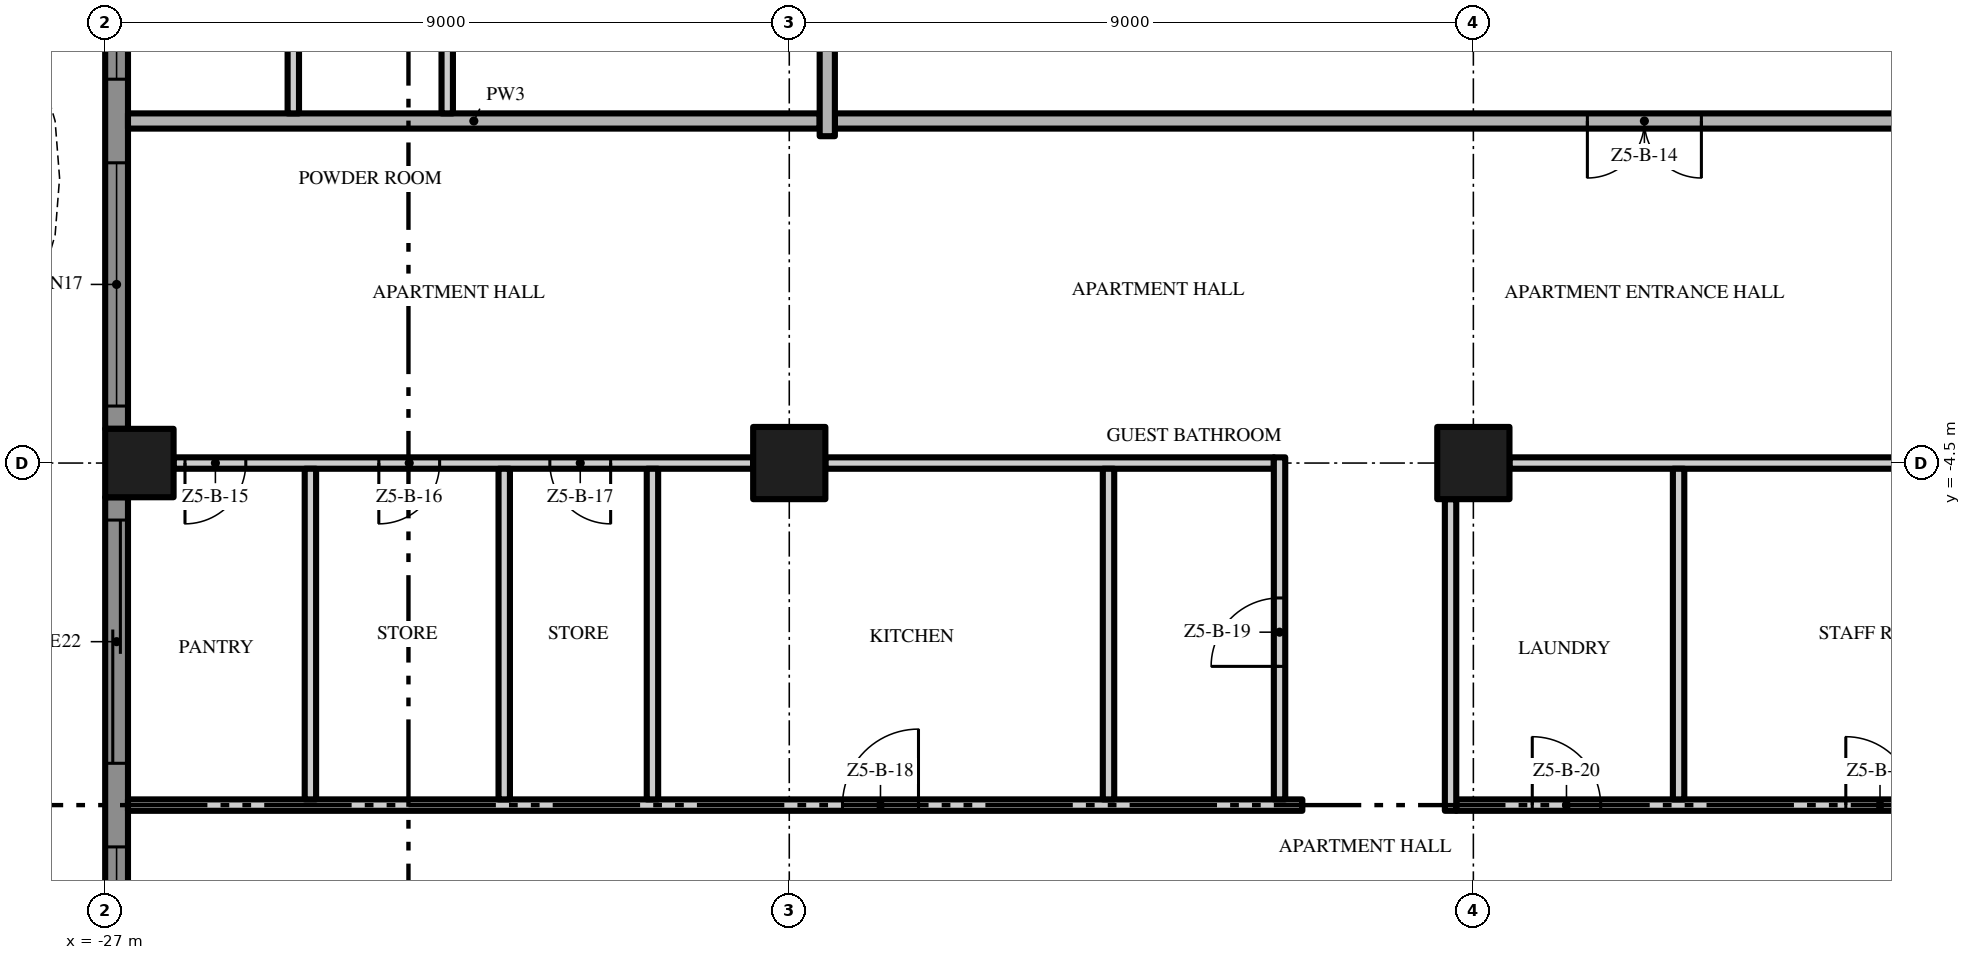
"""IFC4 building model, lengths in metres.
Left out: names, types, materials, properties, quantities, classifications, styles, units other than length and angle.
Written with IfcOpenShell. Run it as: python <this file> out.ifc"""

import sys

from ifc_helpers import new_model, si_unit, direction, frame, frame_2d, origin, origin_2d, place, context, subcontext, project, spatial, polyline, rectangle, outline, extrude, element, fill, save


model = new_model("IFC4")
c1 = context("Model", 3, precision=1e-05, world=origin(), true_north=direction((0.0, 1.0)))
c2 = subcontext(c1, "Body", "Model", "MODEL_VIEW")
j1 = project(units=[si_unit("LENGTHUNIT", "METRE"), si_unit("PLANEANGLEUNIT", "RADIAN")], contexts=[c1])
p1 = place(None, origin())
s1 = spatial("IfcSite", under=j1, at=p1, CompositionType="ELEMENT")
p2 = place(p1, origin())
s2 = spatial("IfcBuilding", under=s1, at=p2, CompositionType="ELEMENT")
p3 = place(p2, frame((0.0, 0.0, 257.8)))
s3 = spatial("IfcBuildingStorey", under=s2, at=p3, CompositionType="ELEMENT", Elevation=257.8)
p4 = place(p3, frame((-18.0, -4.5, 0.0), z_axis=(0.0, 0.0, 1.0), x_axis=(1.0, 0.0, 0.0)))
e1 = element("IfcColumn", 1, at=p4, inside=s3, PredefinedType="COLUMN", context=c2, shape_type="SweptSolid", body=[
    extrude(rectangle(XDim=0.95, YDim=0.95, at=origin_2d()), origin(), (0.0, 0.0, 1.0), 3.5),
])
p5 = place(p3, frame((-26.55, -4.5, 0.0), z_axis=(0.0, 0.0, 1.0), x_axis=(1.0, 0.0, 0.0)))
e2 = element("IfcColumn", 2, at=p5, inside=s3, PredefinedType="COLUMN", context=c2, shape_type="SweptSolid", body=[
    extrude(rectangle(XDim=0.9, YDim=0.9, at=origin_2d()), origin(), (0.0, 0.0, 1.0), 3.5),
])
p6 = place(p3, frame((-9.0, -4.5, 0.0), z_axis=(0.0, 0.0, 1.0), x_axis=(1.0, 0.0, 0.0)))
e3 = element("IfcColumn", 3, at=p6, inside=s3, PredefinedType="COLUMN", context=c2, shape_type="SweptSolid", body=[
    extrude(rectangle(XDim=0.95, YDim=0.95, at=origin_2d()), origin(), (0.0, 0.0, 1.0), 3.5),
])
p7 = place(p3, frame((-26.85, -4.05, 0.0), z_axis=(0.0, 0.0, 1.0), x_axis=(0.0, 1.0, 0.0)))
e4 = element("IfcWall", 4, at=p7, inside=s3, PredefinedType="SOLIDWALL", context=c2, shape_type="SweptSolid", body=[
    extrude(rectangle(XDim=8.1, YDim=0.3, at=frame_2d((4.05, 0.0))), origin(), (0.0, 0.0, 1.0), 3.5),
])
p8 = place(p7, frame((4.6, 0.0, 0.45)))
e5 = element("IfcOpeningElement", 5, at=p8, cuts=e4, PredefinedType="OPENING", context=c2, shape_type="SweptSolid", body=[
    extrude(rectangle(XDim=3.2, YDim=2.65, at=frame_2d((1.6, 1.325))), frame((0.0, 0.16, 0.0), z_axis=(0.0, -1.0, 0.0), x_axis=(1.0, 0.0, 0.0)), (0.0, 0.0, 1.0), 0.32),
])
p9 = place(p7, frame((0.3, 0.0, 0.45)))
e6 = element("IfcOpeningElement", 6, at=p9, cuts=e4, PredefinedType="OPENING", context=c2, shape_type="SweptSolid", body=[
    extrude(rectangle(XDim=3.2, YDim=2.65, at=frame_2d((1.6, 1.325))), frame((0.0, 0.16, 0.0), z_axis=(0.0, -1.0, 0.0), x_axis=(1.0, 0.0, 0.0)), (0.0, 0.0, 1.0), 0.32),
])
p10 = place(p3, frame((-26.85, -13.05, 0.0), z_axis=(0.0, 0.0, 1.0), x_axis=(0.0, 1.0, 0.0)))
e7 = element("IfcWall", 7, at=p10, inside=s3, PredefinedType="SOLIDWALL", context=c2, shape_type="SweptSolid", body=[
    extrude(rectangle(XDim=8.1, YDim=0.3, at=frame_2d((4.05, 0.0))), origin(), (0.0, 0.0, 1.0), 3.5),
])
p11 = place(p10, frame((4.6, 0.0, 0.0)))
e8 = element("IfcOpeningElement", 8, at=p11, cuts=e7, PredefinedType="OPENING", context=c2, shape_type="SweptSolid", body=[
    extrude(rectangle(XDim=3.2, YDim=2.4, at=frame_2d((1.6, 1.2))), frame((0.0, 0.16, 0.0), z_axis=(0.0, -1.0, 0.0), x_axis=(1.0, 0.0, 0.0)), (0.0, 0.0, 1.0), 0.32),
])
p12 = place(p10, frame((0.3, 0.0, 0.45)))
e9 = element("IfcOpeningElement", 9, at=p12, cuts=e7, PredefinedType="OPENING", context=c2, shape_type="SweptSolid", body=[
    extrude(rectangle(XDim=3.2, YDim=2.65, at=frame_2d((1.6, 1.325))), frame((0.0, 0.16, 0.0), z_axis=(0.0, -1.0, 0.0), x_axis=(1.0, 0.0, 0.0)), (0.0, 0.0, 1.0), 0.32),
])
p13 = place(p3, origin())
e10 = element("IfcWall", 10, at=p13, inside=s3, PredefinedType="USERDEFINED", context=c2, shape_type="SweptSolid", body=[
    extrude(outline(polyline([(-28.8, 18.0), (-28.095, 16.5), (-27.659, 15.0), (-27.6, 14.25), (-27.659, 13.5), (-28.095, 12.0), (-28.8, 10.5), (-29.505, 9.0), (-29.941, 7.5), (-30.0, 6.75), (-29.941, 6.0), (-29.505, 4.5), (-28.8, 3.0), (-28.095, 1.5), (-27.659, 0.0), (-27.6, -0.75), (-27.659, -1.5), (-28.095, -3.0), (-28.8, -4.5), (-29.505, -6.0), (-29.941, -7.5), (-30.0, -8.25), (-29.941, -9.0), (-29.505, -10.5), (-28.8, -12.0), (-28.095, -13.5), (-27.659, -15.0), (-27.6, -15.75), (-27.659, -16.5), (-28.095, -18.0), (-27.855, -18.07), (-27.411, -16.545), (-27.349, -15.75), (-27.411, -14.955), (-27.86, -13.411), (-28.574, -11.894), (-29.271, -10.411), (-29.694, -8.955), (-29.749, -8.25), (-29.694, -7.545), (-29.271, -6.089), (-28.574, -4.606), (-27.86, -3.089), (-27.411, -1.545), (-27.349, -0.75), (-27.411, 0.045), (-27.86, 1.589), (-28.574, 3.106), (-29.271, 4.589), (-29.694, 6.045), (-29.749, 6.75), (-29.694, 7.455), (-29.271, 8.911), (-28.574, 10.394), (-27.86, 11.911), (-27.411, 13.455), (-27.349, 14.25), (-27.411, 15.045), (-27.86, 16.589), (-28.574, 18.106), (-28.8, 18.0)])), origin(), (0.0, 0.0, 1.0), 0.9),
])
p14 = place(p3, frame((-26.7, -9.0, 0.0), z_axis=(0.0, 0.0, 1.0), x_axis=(1.0, 0.0, 0.0)))
e11 = element("IfcWall", 11, at=p14, inside=s3, PredefinedType="PARTITIONING", context=c2, shape_type="SweptSolid", body=[
    extrude(rectangle(XDim=15.45, YDim=0.15, at=frame_2d((7.725, 0.0))), origin(), (0.0, 0.0, 1.0), 3.5),
])
p15 = place(p14, frame((9.4, 0.0, 0.0)))
e12 = element("IfcOpeningElement", 12, at=p15, cuts=e11, PredefinedType="OPENING", context=c2, shape_type="SweptSolid", body=[
    extrude(rectangle(XDim=1.0, YDim=2.4, at=frame_2d((0.5, 1.2))), frame((0.0, 0.085, 0.0), z_axis=(0.0, -1.0, 0.0), x_axis=(1.0, 0.0, 0.0)), (0.0, 0.0, 1.0), 0.17),
])
p16 = place(p3, frame((-9.225, -9.0, 0.0), z_axis=(0.0, 0.0, 1.0), x_axis=(1.0, 0.0, 0.0)))
e13 = element("IfcWall", 13, at=p16, inside=s3, PredefinedType="PARTITIONING", context=c2, shape_type="SweptSolid", body=[
    extrude(rectangle(XDim=13.625, YDim=0.15, at=frame_2d((6.812, 0.0))), origin(), (0.0, 0.0, 1.0), 3.5),
])
p17 = place(p16, frame((1.0, 0.0, 0.0)))
e14 = element("IfcOpeningElement", 14, at=p17, cuts=e13, PredefinedType="OPENING", context=c2, shape_type="SweptSolid", body=[
    extrude(rectangle(XDim=0.9, YDim=2.1, at=frame_2d((0.45, 1.05))), frame((0.0, 0.085, 0.0), z_axis=(0.0, -1.0, 0.0), x_axis=(1.0, 0.0, 0.0)), (0.0, 0.0, 1.0), 0.17),
])
p18 = place(p16, frame((5.125, 0.0, 0.0)))
e15 = element("IfcOpeningElement", 15, at=p18, cuts=e13, PredefinedType="OPENING", context=c2, shape_type="SweptSolid", body=[
    extrude(rectangle(XDim=0.9, YDim=2.1, at=frame_2d((0.45, 1.05))), frame((0.0, 0.085, 0.0), z_axis=(0.0, -1.0, 0.0), x_axis=(1.0, 0.0, 0.0)), (0.0, 0.0, 1.0), 0.17),
])
p19 = place(p3, frame((-18.475, -4.5, 0.0), z_axis=(0.0, 0.0, 1.0), x_axis=(-1.0, 0.0, 0.0)))
e16 = element("IfcWall", 16, at=p19, inside=s3, PredefinedType="PARTITIONING", context=c2, shape_type="SweptSolid", body=[
    extrude(rectangle(XDim=7.625, YDim=0.15, at=frame_2d((3.812, 0.0))), origin(), (0.0, 0.0, 1.0), 3.5),
])
p20 = place(p19, frame((6.675, 0.0, 0.0)))
e17 = element("IfcOpeningElement", 17, at=p20, cuts=e16, PredefinedType="OPENING", context=c2, shape_type="SweptSolid", body=[
    extrude(rectangle(XDim=0.8, YDim=2.0, at=frame_2d((0.4, 1.0))), frame((0.0, 0.085, 0.0), z_axis=(0.0, -1.0, 0.0), x_axis=(1.0, 0.0, 0.0)), (0.0, 0.0, 1.0), 0.17),
])
p21 = place(p19, frame((4.125, 0.0, 0.0)))
e18 = element("IfcOpeningElement", 18, at=p21, cuts=e16, PredefinedType="OPENING", context=c2, shape_type="SweptSolid", body=[
    extrude(rectangle(XDim=0.8, YDim=2.0, at=frame_2d((0.4, 1.0))), frame((0.0, 0.085, 0.0), z_axis=(0.0, -1.0, 0.0), x_axis=(1.0, 0.0, 0.0)), (0.0, 0.0, 1.0), 0.17),
])
p22 = place(p19, frame((1.875, 0.0, 0.0)))
e19 = element("IfcOpeningElement", 19, at=p22, cuts=e16, PredefinedType="OPENING", context=c2, shape_type="SweptSolid", body=[
    extrude(rectangle(XDim=0.8, YDim=2.0, at=frame_2d((0.4, 1.0))), frame((0.0, 0.085, 0.0), z_axis=(0.0, -1.0, 0.0), x_axis=(1.0, 0.0, 0.0)), (0.0, 0.0, 1.0), 0.17),
])
p23 = place(p3, frame((-17.525, -4.5, 0.0), z_axis=(0.0, 0.0, 1.0), x_axis=(1.0, 0.0, 0.0)))
e20 = element("IfcWall", 20, at=p23, inside=s3, PredefinedType="PARTITIONING", context=c2, shape_type="SweptSolid", body=[
    extrude(rectangle(XDim=5.9, YDim=0.15, at=frame_2d((2.95, 0.0))), origin(), (0.0, 0.0, 1.0), 3.5),
])
p24 = place(p3, frame((-8.525, -4.5, 0.0), z_axis=(0.0, 0.0, 1.0), x_axis=(1.0, 0.0, 0.0)))
e21 = element("IfcWall", 21, at=p24, inside=s3, PredefinedType="PARTITIONING", context=c2, shape_type="SweptSolid", body=[
    extrude(rectangle(XDim=8.05, YDim=0.15, at=frame_2d((4.025, 0.0))), origin(), (0.0, 0.0, 1.0), 3.5),
])
p25 = place(p3, frame((17.4, 0.0, 0.0), z_axis=(0.0, 0.0, 1.0), x_axis=(-1.0, 0.0, 0.0)))
e22 = element("IfcWall", 22, at=p25, inside=s3, PredefinedType="PARTITIONING", context=c2, shape_type="SweptSolid", body=[
    extrude(rectangle(XDim=34.8, YDim=0.2, at=frame_2d((17.4, 0.0))), origin(), (0.0, 0.0, 1.0), 3.5),
])
p26 = place(p25, frame((23.4, 0.0, 0.0)))
e23 = element("IfcOpeningElement", 23, at=p26, cuts=e22, PredefinedType="OPENING", context=c2, shape_type="SweptSolid", body=[
    extrude(rectangle(XDim=1.5, YDim=2.4, at=frame_2d((0.75, 1.2))), frame((0.0, 0.11, 0.0), z_axis=(0.0, -1.0, 0.0), x_axis=(1.0, 0.0, 0.0)), (0.0, 0.0, 1.0), 0.22),
])
p27 = place(p25, frame((5.4, 0.0, 0.0)))
e24 = element("IfcOpeningElement", 24, at=p27, cuts=e22, PredefinedType="OPENING", context=c2, shape_type="SweptSolid", body=[
    extrude(rectangle(XDim=1.5, YDim=2.4, at=frame_2d((0.75, 1.2))), frame((0.0, 0.11, 0.0), z_axis=(0.0, -1.0, 0.0), x_axis=(1.0, 0.0, 0.0)), (0.0, 0.0, 1.0), 0.22),
])
p28 = place(p3, frame((-26.7, 0.0, 0.0), z_axis=(0.0, 0.0, 1.0), x_axis=(1.0, 0.0, 0.0)))
e25 = element("IfcWall", 25, at=p28, inside=s3, PredefinedType="PARTITIONING", context=c2, shape_type="SweptSolid", body=[
    extrude(rectangle(XDim=9.1, YDim=0.2, at=frame_2d((4.55, 0.0))), origin(), (0.0, 0.0, 1.0), 3.5),
])
p29 = place(p3, frame((-24.525, 0.1, 0.0), z_axis=(0.0, 0.0, 1.0), x_axis=(0.0, 1.0, 0.0)))
e26 = element("IfcWall", 26, at=p29, inside=s3, PredefinedType="PARTITIONING", context=c2, shape_type="SweptSolid", body=[
    extrude(rectangle(XDim=2.225, YDim=0.15, at=frame_2d((1.113, 0.0))), origin(), (0.0, 0.0, 1.0), 3.5),
])
p30 = place(p3, frame((-24.3, -8.925, 0.0), z_axis=(0.0, 0.0, 1.0), x_axis=(0.0, 1.0, 0.0)))
e27 = element("IfcWall", 27, at=p30, inside=s3, PredefinedType="PARTITIONING", context=c2, shape_type="SweptSolid", body=[
    extrude(rectangle(XDim=4.35, YDim=0.15, at=frame_2d((2.175, 0.0))), origin(), (0.0, 0.0, 1.0), 3.5),
])
p31 = place(p3, frame((-22.5, 0.1, 0.0), z_axis=(0.0, 0.0, 1.0), x_axis=(0.0, 1.0, 0.0)))
e28 = element("IfcWall", 28, at=p31, inside=s3, PredefinedType="PARTITIONING", context=c2, shape_type="SweptSolid", body=[
    extrude(rectangle(XDim=17.45, YDim=0.15, at=frame_2d((8.725, 0.0))), origin(), (0.0, 0.0, 1.0), 3.5),
])
p32 = place(p31, frame((2.4, 0.0, 0.0)))
e29 = element("IfcOpeningElement", 29, at=p32, cuts=e28, PredefinedType="OPENING", context=c2, shape_type="SweptSolid", body=[
    extrude(rectangle(XDim=1.8, YDim=2.4, at=frame_2d((0.9, 1.2))), frame((0.0, 0.085, 0.0), z_axis=(0.0, -1.0, 0.0), x_axis=(1.0, 0.0, 0.0)), (0.0, 0.0, 1.0), 0.17),
])
p33 = place(p31, frame((10.65, 0.0, 0.0)))
e30 = element("IfcOpeningElement", 30, at=p33, cuts=e28, PredefinedType="OPENING", context=c2, shape_type="SweptSolid", body=[
    extrude(rectangle(XDim=1.0, YDim=2.4, at=frame_2d((0.5, 1.2))), frame((0.0, 0.085, 0.0), z_axis=(0.0, -1.0, 0.0), x_axis=(1.0, 0.0, 0.0)), (0.0, 0.0, 1.0), 0.17),
])
for number, where, z_axis, x_axis in (
    (31, (-21.75, -8.925, 0.0), (0.0, 0.0, 1.0), (0.0, 1.0, 0.0)),
    (32, (-19.8, -8.925, 0.0), (0.0, 0.0, 1.0), (0.0, 1.0, 0.0)),
):
    element("IfcWall", number, at=place(p3, frame(where, z_axis=z_axis, x_axis=x_axis)), inside=s3, PredefinedType="PARTITIONING", context=c2, shape_type="SweptSolid", body=[
        extrude(rectangle(XDim=4.35, YDim=0.15, at=frame_2d((2.175, 0.0))), origin(), (0.0, 0.0, 1.0), 3.5),
    ])
p34 = place(p3, frame((-17.5, -0.2, 0.0), z_axis=(0.0, 0.0, 1.0), x_axis=(0.0, 1.0, 0.0)))
e33 = element("IfcWall", 33, at=p34, inside=s3, PredefinedType="PARTITIONING", context=c2, shape_type="SweptSolid", body=[
    extrude(rectangle(XDim=4.225, YDim=0.2, at=frame_2d((2.112, 0.0))), origin(), (0.0, 0.0, 1.0), 3.5),
])
p35 = place(p3, frame((-13.8, -8.925, 0.0), z_axis=(0.0, 0.0, 1.0), x_axis=(0.0, 1.0, 0.0)))
e34 = element("IfcWall", 34, at=p35, inside=s3, PredefinedType="PARTITIONING", context=c2, shape_type="SweptSolid", body=[
    extrude(rectangle(XDim=4.35, YDim=0.15, at=frame_2d((2.175, 0.0))), origin(), (0.0, 0.0, 1.0), 3.5),
])
p36 = place(p3, frame((-11.55, -8.925, 0.0), z_axis=(0.0, 0.0, 1.0), x_axis=(0.0, 1.0, 0.0)))
e35 = element("IfcWall", 35, at=p36, inside=s3, PredefinedType="PARTITIONING", context=c2, shape_type="SweptSolid", body=[
    extrude(rectangle(XDim=4.5, YDim=0.15, at=frame_2d((2.25, 0.0))), origin(), (0.0, 0.0, 1.0), 3.5),
])
p37 = place(p36, frame((1.75, 0.0, 0.0)))
e36 = element("IfcOpeningElement", 36, at=p37, cuts=e35, PredefinedType="OPENING", context=c2, shape_type="SweptSolid", body=[
    extrude(rectangle(XDim=0.9, YDim=2.1, at=frame_2d((0.45, 1.05))), frame((0.0, 0.085, 0.0), z_axis=(0.0, -1.0, 0.0), x_axis=(1.0, 0.0, 0.0)), (0.0, 0.0, 1.0), 0.17),
])
p38 = place(p3, frame((-9.3, -9.075, 0.0), z_axis=(0.0, 0.0, 1.0), x_axis=(0.0, 1.0, 0.0)))
e37 = element("IfcWall", 37, at=p38, inside=s3, PredefinedType="PARTITIONING", context=c2, shape_type="SweptSolid", body=[
    extrude(rectangle(XDim=4.1, YDim=0.15, at=frame_2d((2.05, 0.0))), origin(), (0.0, 0.0, 1.0), 3.5),
])
p39 = place(p3, frame((-6.3, -8.925, 0.0), z_axis=(0.0, 0.0, 1.0), x_axis=(0.0, 1.0, 0.0)))
e38 = element("IfcWall", 38, at=p39, inside=s3, PredefinedType="PARTITIONING", context=c2, shape_type="SweptSolid", body=[
    extrude(rectangle(XDim=4.35, YDim=0.15, at=frame_2d((2.175, 0.0))), origin(), (0.0, 0.0, 1.0), 3.5),
])
p40 = place(p8, origin())
e39 = element("IfcWindow", 39, at=p40, inside=s3, PartitioningType="SINGLE_PANEL", PredefinedType="WINDOW", context=c2, shape_type="SweptSolid", body=[
    extrude(rectangle(XDim=3.2, YDim=2.65, at=frame_2d((1.6, 1.325))), frame((0.0, 0.03, 0.0), z_axis=(0.0, -1.0, 0.0), x_axis=(1.0, 0.0, 0.0)), (0.0, 0.0, 1.0), 0.06),
])
fill(e5, e39)
p41 = place(p9, origin())
e40 = element("IfcWindow", 40, at=p41, inside=s3, PartitioningType="SINGLE_PANEL", PredefinedType="WINDOW", context=c2, shape_type="SweptSolid", body=[
    extrude(rectangle(XDim=3.2, YDim=2.65, at=frame_2d((1.6, 1.325))), frame((0.0, 0.03, 0.0), z_axis=(0.0, -1.0, 0.0), x_axis=(1.0, 0.0, 0.0)), (0.0, 0.0, 1.0), 0.06),
])
fill(e6, e40)
p42 = place(p11, origin())
e41 = element("IfcDoor", 41, at=p42, inside=s3, OperationType="SINGLE_SWING_LEFT", PredefinedType="DOOR", context=c2, shape_type="SweptSolid", body=[
    extrude(rectangle(XDim=3.2, YDim=2.4, at=frame_2d((1.6, 1.2))), frame((0.0, 0.025, 0.0), z_axis=(0.0, -1.0, 0.0), x_axis=(1.0, 0.0, 0.0)), (0.0, 0.0, 1.0), 0.05),
])
fill(e8, e41)
p43 = place(p12, origin())
e42 = element("IfcWindow", 42, at=p43, inside=s3, PartitioningType="SINGLE_PANEL", PredefinedType="WINDOW", context=c2, shape_type="SweptSolid", body=[
    extrude(rectangle(XDim=3.2, YDim=2.65, at=frame_2d((1.6, 1.325))), frame((0.0, 0.03, 0.0), z_axis=(0.0, -1.0, 0.0), x_axis=(1.0, 0.0, 0.0)), (0.0, 0.0, 1.0), 0.06),
])
fill(e9, e42)
p44 = place(p26, origin())
e43 = element("IfcDoor", 43, at=p44, inside=s3, OperationType="DOUBLE_DOOR_SINGLE_SWING", PredefinedType="DOOR", context=c2, shape_type="SweptSolid", body=[
    extrude(rectangle(XDim=1.5, YDim=2.4, at=frame_2d((0.75, 1.2))), frame((0.0, 0.025, 0.0), z_axis=(0.0, -1.0, 0.0), x_axis=(1.0, 0.0, 0.0)), (0.0, 0.0, 1.0), 0.05),
])
fill(e23, e43)
p45 = place(p20, origin())
e44 = element("IfcDoor", 44, at=p45, inside=s3, OperationType="SINGLE_SWING_RIGHT", PredefinedType="DOOR", context=c2, shape_type="SweptSolid", body=[
    extrude(rectangle(XDim=0.8, YDim=2.0, at=frame_2d((0.4, 1.0))), frame((0.0, 0.025, 0.0), z_axis=(0.0, -1.0, 0.0), x_axis=(1.0, 0.0, 0.0)), (0.0, 0.0, 1.0), 0.05),
])
fill(e17, e44)
p46 = place(p21, origin())
e45 = element("IfcDoor", 45, at=p46, inside=s3, OperationType="SINGLE_SWING_RIGHT", PredefinedType="DOOR", context=c2, shape_type="SweptSolid", body=[
    extrude(rectangle(XDim=0.8, YDim=2.0, at=frame_2d((0.4, 1.0))), frame((0.0, 0.025, 0.0), z_axis=(0.0, -1.0, 0.0), x_axis=(1.0, 0.0, 0.0)), (0.0, 0.0, 1.0), 0.05),
])
fill(e18, e45)
p47 = place(p22, origin())
e46 = element("IfcDoor", 46, at=p47, inside=s3, OperationType="SINGLE_SWING_LEFT", PredefinedType="DOOR", context=c2, shape_type="SweptSolid", body=[
    extrude(rectangle(XDim=0.8, YDim=2.0, at=frame_2d((0.4, 1.0))), frame((0.0, 0.025, 0.0), z_axis=(0.0, -1.0, 0.0), x_axis=(1.0, 0.0, 0.0)), (0.0, 0.0, 1.0), 0.05),
])
fill(e19, e46)
p48 = place(p15, origin())
e47 = element("IfcDoor", 47, at=p48, inside=s3, OperationType="SINGLE_SWING_RIGHT", PredefinedType="DOOR", context=c2, shape_type="SweptSolid", body=[
    extrude(rectangle(XDim=1.0, YDim=2.4, at=frame_2d((0.5, 1.2))), frame((0.0, 0.025, 0.0), z_axis=(0.0, -1.0, 0.0), x_axis=(1.0, 0.0, 0.0)), (0.0, 0.0, 1.0), 0.05),
])
fill(e12, e47)
p49 = place(p37, origin())
e48 = element("IfcDoor", 48, at=p49, inside=s3, OperationType="SINGLE_SWING_LEFT", PredefinedType="DOOR", context=c2, shape_type="SweptSolid", body=[
    extrude(rectangle(XDim=0.9, YDim=2.1, at=frame_2d((0.45, 1.05))), frame((0.0, 0.025, 0.0), z_axis=(0.0, -1.0, 0.0), x_axis=(1.0, 0.0, 0.0)), (0.0, 0.0, 1.0), 0.05),
])
fill(e36, e48)
p50 = place(p17, origin())
e49 = element("IfcDoor", 49, at=p50, inside=s3, OperationType="SINGLE_SWING_LEFT", PredefinedType="DOOR", context=c2, shape_type="SweptSolid", body=[
    extrude(rectangle(XDim=0.9, YDim=2.1, at=frame_2d((0.45, 1.05))), frame((0.0, 0.025, 0.0), z_axis=(0.0, -1.0, 0.0), x_axis=(1.0, 0.0, 0.0)), (0.0, 0.0, 1.0), 0.05),
])
fill(e14, e49)
p51 = place(p18, origin())
e50 = element("IfcDoor", 50, at=p51, inside=s3, OperationType="SINGLE_SWING_LEFT", PredefinedType="DOOR", context=c2, shape_type="SweptSolid", body=[
    extrude(rectangle(XDim=0.9, YDim=2.1, at=frame_2d((0.45, 1.05))), frame((0.0, 0.025, 0.0), z_axis=(0.0, -1.0, 0.0), x_axis=(1.0, 0.0, 0.0)), (0.0, 0.0, 1.0), 0.05),
])
fill(e15, e50)
save(model, sys.argv[1])
